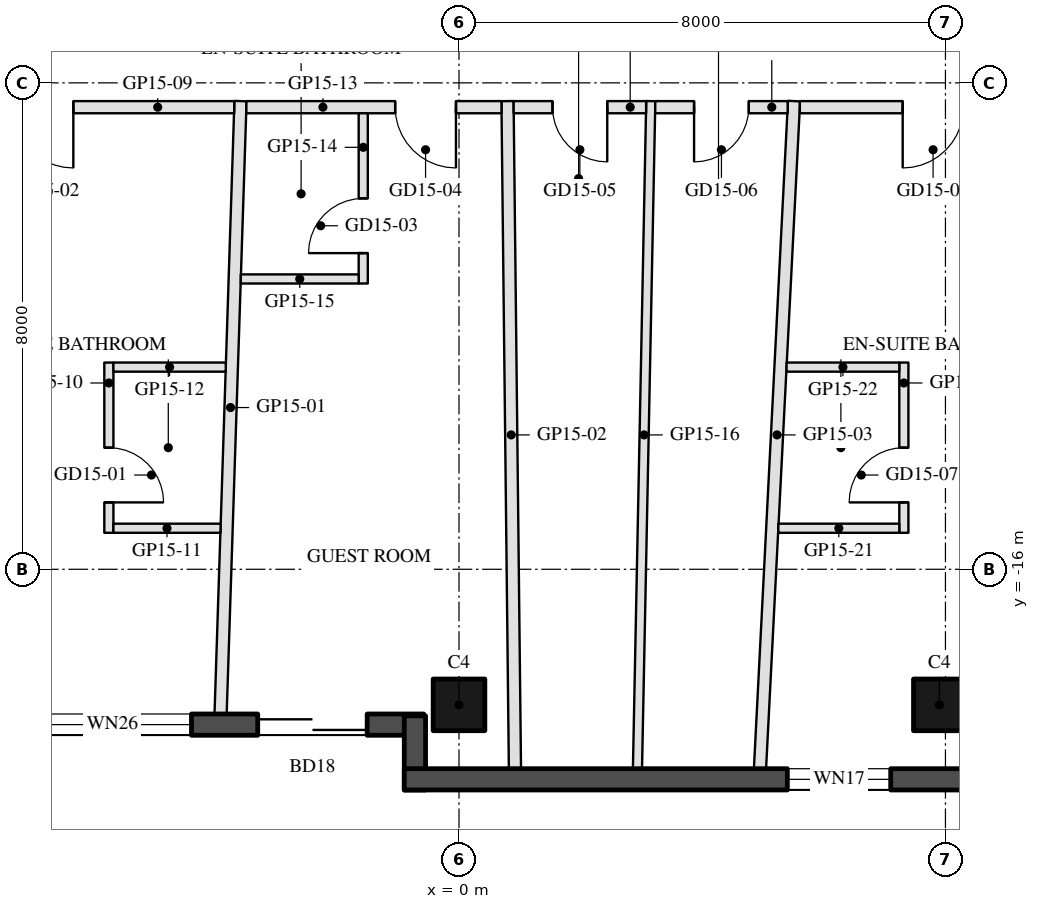
"""IFC4 building model, lengths in metres.
Left out: names, types, materials, properties, quantities, classifications, styles, units other than length and angle.
Written with IfcOpenShell. Run it as: python <this file> out.ifc"""

import sys

from ifc_helpers import new_model, si_unit, direction, frame, frame_2d, origin, origin_2d, place, context, subcontext, project, spatial, rectangle, hollow_rectangle, extrude, element, fill, save


model = new_model("IFC4")
c1 = context("Model", 3, precision=1e-05, world=origin(), true_north=direction((0.0, 1.0)))
c2 = subcontext(c1, "Body", "Model", "MODEL_VIEW")
j1 = project(units=[si_unit("LENGTHUNIT", "METRE"), si_unit("PLANEANGLEUNIT", "RADIAN")], contexts=[c1])
p1 = place(None, origin())
s1 = spatial("IfcSite", under=j1, at=p1, CompositionType="ELEMENT")
p2 = place(p1, origin())
s2 = spatial("IfcBuilding", under=s1, at=p2, CompositionType="ELEMENT")
p3 = place(p2, frame((0.0, 0.0, 172.5)))
s3 = spatial("IfcBuildingStorey", under=s2, at=p3, CompositionType="ELEMENT", Elevation=172.5)
for number, where, z_axis, x_axis in (
    (1, (0.0, -18.23, 0.0), (0.0, 0.0, 1.0), (-1.0, 0.0, 0.0)),
    (2, (7.9, -18.23, 0.0), (0.0, 0.0, 1.0), (-1.0, 0.0, 0.0)),
):
    element("IfcColumn", number, at=place(p3, frame(where, z_axis=z_axis, x_axis=x_axis)), inside=s3, PredefinedType="COLUMN", context=c2, shape_type="SweptSolid", body=[
        extrude(hollow_rectangle(XDim=0.85, YDim=0.85, WallThickness=0.04, at=origin_2d()), origin(), (0.0, 0.0, 1.0), 3.7),
    ])
p4 = place(p3, frame((-7.32, -18.555, 0.0), z_axis=(0.0, 0.0, 1.0), x_axis=(1.0, 0.0, 0.0)))
e3 = element("IfcWall", 3, at=p4, inside=s3, PredefinedType="SOLIDWALL", context=c2, shape_type="SweptSolid", body=[
    extrude(rectangle(XDim=6.74, YDim=0.35, at=frame_2d((3.37, 0.0))), origin(), (0.0, 0.0, 1.0), 3.55),
])
p5 = place(p4, frame((0.32, 0.0, 0.3)))
e4 = element("IfcOpeningElement", 4, at=p5, cuts=e3, PredefinedType="OPENING", context=c2, shape_type="SweptSolid", body=[
    extrude(rectangle(XDim=2.6, YDim=2.65, at=frame_2d((1.3, 1.325))), frame((0.0, 0.185, 0.0), z_axis=(0.0, -1.0, 0.0), x_axis=(1.0, 0.0, 0.0)), (0.0, 0.0, 1.0), 0.37),
])
p6 = place(p4, frame((4.01, 0.0, 0.0)))
e5 = element("IfcOpeningElement", 5, at=p6, cuts=e3, PredefinedType="OPENING", context=c2, shape_type="SweptSolid", body=[
    extrude(rectangle(XDim=1.8, YDim=2.4, at=frame_2d((0.9, 1.2))), frame((0.0, 0.185, 0.0), z_axis=(0.0, -1.0, 0.0), x_axis=(1.0, 0.0, 0.0)), (0.0, 0.0, 1.0), 0.37),
])
p7 = place(p3, frame((-0.725, -18.41, 0.0), z_axis=(0.0, 0.0, 1.0), x_axis=(0.0, -1.0, 0.0)))
e6 = element("IfcWall", 6, at=p7, inside=s3, PredefinedType="SOLIDWALL", context=c2, shape_type="SweptSolid", body=[
    extrude(rectangle(XDim=1.22, YDim=0.35, at=frame_2d((0.61, 0.0))), origin(), (0.0, 0.0, 1.0), 3.55),
])
p8 = place(p3, frame((-0.9, -19.455, 0.0), z_axis=(0.0, 0.0, 1.0), x_axis=(1.0, 0.0, 0.0)))
e7 = element("IfcWall", 7, at=p8, inside=s3, PredefinedType="SOLIDWALL", context=c2, shape_type="SweptSolid", body=[
    extrude(rectangle(XDim=9.7, YDim=0.35, at=frame_2d((4.85, 0.0))), origin(), (0.0, 0.0, 1.0), 3.55),
])
p9 = place(p8, frame((6.3, 0.0, 0.3)))
e8 = element("IfcOpeningElement", 8, at=p9, cuts=e7, PredefinedType="OPENING", context=c2, shape_type="SweptSolid", body=[
    extrude(rectangle(XDim=1.7, YDim=2.65, at=frame_2d((0.85, 1.325))), frame((0.0, 0.185, 0.0), z_axis=(0.0, -1.0, 0.0), x_axis=(1.0, 0.0, 0.0)), (0.0, 0.0, 1.0), 0.37),
])
p10 = place(p3, frame((-3.921, -18.38, 0.0), z_axis=(0.0, 0.0, 1.0), x_axis=(0.032462838588, 0.999472943161, 0.0)))
e9 = element("IfcWall", 9, at=p10, inside=s3, PredefinedType="PARTITIONING", context=c2, shape_type="SweptSolid", body=[
    extrude(rectangle(XDim=10.085, YDim=0.2, at=frame_2d((5.042, 0.0))), origin(), (0.0, 0.0, 1.0), 2.95),
])
p11 = place(p3, frame((0.92, -19.28, 0.0), z_axis=(0.0, 0.0, 1.0), x_axis=(-0.011116847578, 0.999938205941, 0.0)))
e10 = element("IfcWall", 10, at=p11, inside=s3, PredefinedType="PARTITIONING", context=c2, shape_type="SweptSolid", body=[
    extrude(rectangle(XDim=10.981, YDim=0.2, at=frame_2d((5.49, 0.0))), origin(), (0.0, 0.0, 1.0), 3.06),
])
p12 = place(p3, frame((4.95, -19.28, 0.0), z_axis=(0.0, 0.0, 1.0), x_axis=(0.050963172582, 0.998700533213, 0.0)))
e11 = element("IfcWall", 11, at=p12, inside=s3, PredefinedType="PARTITIONING", context=c2, shape_type="SweptSolid", body=[
    extrude(rectangle(XDim=10.994, YDim=0.2, at=frame_2d((5.497, 0.0))), origin(), (0.0, 0.0, 1.0), 3.06),
])
p13 = place(p3, frame((-3.697, -8.4, 0.0), z_axis=(0.0, 0.0, 1.0), x_axis=(-1.0, 0.0, 0.0)))
e12 = element("IfcWall", 12, at=p13, inside=s3, PredefinedType="PARTITIONING", context=c2, shape_type="SweptSolid", body=[
    extrude(rectangle(XDim=6.292, YDim=0.2, at=frame_2d((3.146, 0.0))), origin(), (0.0, 0.0, 1.0), 2.95),
])
p14 = place(p13, frame((2.646, 0.0, 0.0)))
e13 = element("IfcOpeningElement", 13, at=p14, cuts=e12, PredefinedType="OPENING", context=c2, shape_type="SweptSolid", body=[
    extrude(rectangle(XDim=1.0, YDim=2.1, at=frame_2d((0.5, 1.05))), frame((0.0, 0.11, 0.0), z_axis=(0.0, -1.0, 0.0), x_axis=(1.0, 0.0, 0.0)), (0.0, 0.0, 1.0), 0.22),
])
p15 = place(p3, frame((-5.758, -12.6, 0.0), z_axis=(0.0, 0.0, 1.0), x_axis=(0.0, -1.0, 0.0)))
e14 = element("IfcWall", 14, at=p15, inside=s3, PredefinedType="PARTITIONING", context=c2, shape_type="SweptSolid", body=[
    extrude(rectangle(XDim=2.8, YDim=0.15, at=frame_2d((1.4, 0.0))), origin(), (0.0, 0.0, 1.0), 3.55),
])
p16 = place(p15, frame((1.4, 0.0, 0.0)))
e15 = element("IfcOpeningElement", 15, at=p16, cuts=e14, PredefinedType="OPENING", context=c2, shape_type="SweptSolid", body=[
    extrude(rectangle(XDim=0.9, YDim=2.1, at=frame_2d((0.45, 1.05))), frame((0.0, 0.085, 0.0), z_axis=(0.0, -1.0, 0.0), x_axis=(1.0, 0.0, 0.0)), (0.0, 0.0, 1.0), 0.17),
])
p17 = place(p3, frame((-5.683, -15.325, 0.0), z_axis=(0.0, 0.0, 1.0), x_axis=(1.0, 0.0, 0.0)))
e16 = element("IfcWall", 16, at=p17, inside=s3, PredefinedType="PARTITIONING", context=c2, shape_type="SweptSolid", body=[
    extrude(rectangle(XDim=1.761, YDim=0.15, at=frame_2d((0.881, 0.0))), origin(), (0.0, 0.0, 1.0), 2.95),
])
p18 = place(p3, frame((-5.683, -12.675, 0.0), z_axis=(0.0, 0.0, 1.0), x_axis=(1.0, 0.0, 0.0)))
e17 = element("IfcWall", 17, at=p18, inside=s3, PredefinedType="PARTITIONING", context=c2, shape_type="SweptSolid", body=[
    extrude(rectangle(XDim=1.847, YDim=0.15, at=frame_2d((0.924, 0.0))), origin(), (0.0, 0.0, 1.0), 2.95),
])
p19 = place(p3, frame((0.699, -8.4, 0.0), z_axis=(0.0, 0.0, 1.0), x_axis=(-1.0, 0.0, 0.0)))
e18 = element("IfcWall", 18, at=p19, inside=s3, PredefinedType="PARTITIONING", context=c2, shape_type="SweptSolid", body=[
    extrude(rectangle(XDim=4.196, YDim=0.2, at=frame_2d((2.098, 0.0))), origin(), (0.0, 0.0, 1.0), 2.95),
])
p20 = place(p19, frame((0.749, 0.0, 0.0)))
e19 = element("IfcOpeningElement", 19, at=p20, cuts=e18, PredefinedType="OPENING", context=c2, shape_type="SweptSolid", body=[
    extrude(rectangle(XDim=1.0, YDim=2.1, at=frame_2d((0.5, 1.05))), frame((0.0, 0.11, 0.0), z_axis=(0.0, -1.0, 0.0), x_axis=(1.0, 0.0, 0.0)), (0.0, 0.0, 1.0), 0.22),
])
p21 = place(p3, frame((-1.575, -11.3, 0.0), z_axis=(0.0, 0.0, 1.0), x_axis=(0.0, 1.0, 0.0)))
e20 = element("IfcWall", 20, at=p21, inside=s3, PredefinedType="PARTITIONING", context=c2, shape_type="SweptSolid", body=[
    extrude(rectangle(XDim=2.8, YDim=0.15, at=frame_2d((1.4, 0.0))), origin(), (0.0, 0.0, 1.0), 3.55),
])
p22 = place(p21, frame((0.5, 0.0, 0.0)))
e21 = element("IfcOpeningElement", 21, at=p22, cuts=e20, PredefinedType="OPENING", context=c2, shape_type="SweptSolid", body=[
    extrude(rectangle(XDim=0.9, YDim=2.1, at=frame_2d((0.45, 1.05))), frame((0.0, 0.085, 0.0), z_axis=(0.0, -1.0, 0.0), x_axis=(1.0, 0.0, 0.0)), (0.0, 0.0, 1.0), 0.17),
])
p23 = place(p3, frame((-3.588, -11.225, 0.0), z_axis=(0.0, 0.0, 1.0), x_axis=(1.0, 0.0, 0.0)))
e22 = element("IfcWall", 22, at=p23, inside=s3, PredefinedType="PARTITIONING", context=c2, shape_type="SweptSolid", body=[
    extrude(rectangle(XDim=1.938, YDim=0.15, at=frame_2d((0.969, 0.0))), origin(), (0.0, 0.0, 1.0), 3.55),
])
p24 = place(p3, frame((2.935, -19.28, 0.0), z_axis=(0.0, 0.0, 1.0), x_axis=(0.019940891206, 0.99980116066, 0.0)))
e23 = element("IfcWall", 23, at=p24, inside=s3, PredefinedType="PARTITIONING", context=c2, shape_type="SweptSolid", body=[
    extrude(rectangle(XDim=10.982, YDim=0.15, at=frame_2d((5.491, 0.0))), origin(), (0.0, 0.0, 1.0), 3.06),
])
p25 = place(p3, frame((3.077, -8.4, 0.0), z_axis=(0.0, 0.0, 1.0), x_axis=(-1.0, 0.0, 0.0)))
e24 = element("IfcWall", 24, at=p25, inside=s3, PredefinedType="PARTITIONING", context=c2, shape_type="SweptSolid", body=[
    extrude(rectangle(XDim=2.178, YDim=0.2, at=frame_2d((1.089, 0.0))), origin(), (0.0, 0.0, 1.0), 3.55),
])
p26 = place(p25, frame((0.639, 0.0, 0.0)))
e25 = element("IfcOpeningElement", 25, at=p26, cuts=e24, PredefinedType="OPENING", context=c2, shape_type="SweptSolid", body=[
    extrude(rectangle(XDim=0.9, YDim=2.1, at=frame_2d((0.45, 1.05))), frame((0.0, 0.11, 0.0), z_axis=(0.0, -1.0, 0.0), x_axis=(1.0, 0.0, 0.0)), (0.0, 0.0, 1.0), 0.22),
])
p27 = place(p3, frame((5.405, -8.4, 0.0), z_axis=(0.0, 0.0, 1.0), x_axis=(-1.0, 0.0, 0.0)))
e26 = element("IfcWall", 26, at=p27, inside=s3, PredefinedType="PARTITIONING", context=c2, shape_type="SweptSolid", body=[
    extrude(rectangle(XDim=2.178, YDim=0.2, at=frame_2d((1.089, 0.0))), origin(), (0.0, 0.0, 1.0), 2.95),
])
p28 = place(p27, frame((0.639, 0.0, 0.0)))
e27 = element("IfcOpeningElement", 27, at=p28, cuts=e26, PredefinedType="OPENING", context=c2, shape_type="SweptSolid", body=[
    extrude(rectangle(XDim=0.9, YDim=2.1, at=frame_2d((0.45, 1.05))), frame((0.0, 0.11, 0.0), z_axis=(0.0, -1.0, 0.0), x_axis=(1.0, 0.0, 0.0)), (0.0, 0.0, 1.0), 0.22),
])
p29 = place(p3, frame((9.988, -8.4, 0.0), z_axis=(0.0, 0.0, 1.0), x_axis=(-1.0, 0.0, 0.0)))
e28 = element("IfcWall", 28, at=p29, inside=s3, PredefinedType="PARTITIONING", context=c2, shape_type="SweptSolid", body=[
    extrude(rectangle(XDim=4.383, YDim=0.2, at=frame_2d((2.191, 0.0))), origin(), (0.0, 0.0, 1.0), 2.95),
])
p30 = place(p29, frame((1.691, 0.0, 0.0)))
e29 = element("IfcOpeningElement", 29, at=p30, cuts=e28, PredefinedType="OPENING", context=c2, shape_type="SweptSolid", body=[
    extrude(rectangle(XDim=1.0, YDim=2.1, at=frame_2d((0.5, 1.05))), frame((0.0, 0.11, 0.0), z_axis=(0.0, -1.0, 0.0), x_axis=(1.0, 0.0, 0.0)), (0.0, 0.0, 1.0), 0.22),
])
p31 = place(p3, frame((7.316, -15.4, 0.0), z_axis=(0.0, 0.0, 1.0), x_axis=(0.0, 1.0, 0.0)))
e30 = element("IfcWall", 30, at=p31, inside=s3, PredefinedType="PARTITIONING", context=c2, shape_type="SweptSolid", body=[
    extrude(rectangle(XDim=2.8, YDim=0.15, at=frame_2d((1.4, 0.0))), origin(), (0.0, 0.0, 1.0), 3.55),
])
p32 = place(p31, frame((0.5, 0.0, 0.0)))
e31 = element("IfcOpeningElement", 31, at=p32, cuts=e30, PredefinedType="OPENING", context=c2, shape_type="SweptSolid", body=[
    extrude(rectangle(XDim=0.9, YDim=2.1, at=frame_2d((0.45, 1.05))), frame((0.0, 0.085, 0.0), z_axis=(0.0, -1.0, 0.0), x_axis=(1.0, 0.0, 0.0)), (0.0, 0.0, 1.0), 0.17),
])
p33 = place(p3, frame((5.252, -15.325, 0.0), z_axis=(0.0, 0.0, 1.0), x_axis=(1.0, 0.0, 0.0)))
e32 = element("IfcWall", 32, at=p33, inside=s3, PredefinedType="PARTITIONING", context=c2, shape_type="SweptSolid", body=[
    extrude(rectangle(XDim=1.989, YDim=0.15, at=frame_2d((0.995, 0.0))), origin(), (0.0, 0.0, 1.0), 3.55),
])
p34 = place(p3, frame((5.387, -12.675, 0.0), z_axis=(0.0, 0.0, 1.0), x_axis=(1.0, 0.0, 0.0)))
e33 = element("IfcWall", 33, at=p34, inside=s3, PredefinedType="PARTITIONING", context=c2, shape_type="SweptSolid", body=[
    extrude(rectangle(XDim=1.854, YDim=0.15, at=frame_2d((0.927, 0.0))), origin(), (0.0, 0.0, 1.0), 3.55),
])
p35 = place(p5, origin())
e34 = element("IfcWindow", 34, at=p35, inside=s3, PartitioningType="SINGLE_PANEL", PredefinedType="WINDOW", context=c2, shape_type="SweptSolid", body=[
    extrude(rectangle(XDim=2.6, YDim=2.65, at=frame_2d((1.3, 1.325))), frame((0.0, 0.03, 0.0), z_axis=(0.0, -1.0, 0.0), x_axis=(1.0, 0.0, 0.0)), (0.0, 0.0, 1.0), 0.06),
])
fill(e4, e34)
p36 = place(p6, frame((1.8, 0.0, 0.0), z_axis=(0.0, 0.0, 1.0), x_axis=(-1.0, 0.0, 0.0)))
e35 = element("IfcDoor", 35, at=p36, inside=s3, OperationType="SLIDING_TO_LEFT", PredefinedType="DOOR", context=c2, shape_type="SweptSolid", body=[
    extrude(rectangle(XDim=1.8, YDim=2.4, at=frame_2d((0.9, 1.2))), frame((0.0, 0.025, 0.0), z_axis=(0.0, -1.0, 0.0), x_axis=(1.0, 0.0, 0.0)), (0.0, 0.0, 1.0), 0.05),
])
fill(e5, e35)
p37 = place(p9, origin())
e36 = element("IfcWindow", 36, at=p37, inside=s3, PartitioningType="SINGLE_PANEL", PredefinedType="WINDOW", context=c2, shape_type="SweptSolid", body=[
    extrude(rectangle(XDim=1.7, YDim=2.65, at=frame_2d((0.85, 1.325))), frame((0.0, 0.03, 0.0), z_axis=(0.0, -1.0, 0.0), x_axis=(1.0, 0.0, 0.0)), (0.0, 0.0, 1.0), 0.06),
])
fill(e8, e36)
p38 = place(p16, origin())
e37 = element("IfcDoor", 37, at=p38, inside=s3, OperationType="SINGLE_SWING_RIGHT", PredefinedType="DOOR", context=c2, shape_type="SweptSolid", body=[
    extrude(rectangle(XDim=0.9, YDim=2.1, at=frame_2d((0.45, 1.05))), frame((0.0, 0.025, 0.0), z_axis=(0.0, -1.0, 0.0), x_axis=(1.0, 0.0, 0.0)), (0.0, 0.0, 1.0), 0.05),
])
fill(e15, e37)
p39 = place(p14, origin())
e38 = element("IfcDoor", 38, at=p39, inside=s3, OperationType="SINGLE_SWING_LEFT", PredefinedType="DOOR", context=c2, shape_type="SweptSolid", body=[
    extrude(rectangle(XDim=1.0, YDim=2.1, at=frame_2d((0.5, 1.05))), frame((0.0, 0.025, 0.0), z_axis=(0.0, -1.0, 0.0), x_axis=(1.0, 0.0, 0.0)), (0.0, 0.0, 1.0), 0.05),
])
fill(e13, e38)
p40 = place(p22, origin())
e39 = element("IfcDoor", 39, at=p40, inside=s3, OperationType="SINGLE_SWING_LEFT", PredefinedType="DOOR", context=c2, shape_type="SweptSolid", body=[
    extrude(rectangle(XDim=0.9, YDim=2.1, at=frame_2d((0.45, 1.05))), frame((0.0, 0.025, 0.0), z_axis=(0.0, -1.0, 0.0), x_axis=(1.0, 0.0, 0.0)), (0.0, 0.0, 1.0), 0.05),
])
fill(e21, e39)
p41 = place(p20, origin())
e40 = element("IfcDoor", 40, at=p41, inside=s3, OperationType="SINGLE_SWING_LEFT", PredefinedType="DOOR", context=c2, shape_type="SweptSolid", body=[
    extrude(rectangle(XDim=1.0, YDim=2.1, at=frame_2d((0.5, 1.05))), frame((0.0, 0.025, 0.0), z_axis=(0.0, -1.0, 0.0), x_axis=(1.0, 0.0, 0.0)), (0.0, 0.0, 1.0), 0.05),
])
fill(e19, e40)
p42 = place(p26, origin())
e41 = element("IfcDoor", 41, at=p42, inside=s3, OperationType="SINGLE_SWING_LEFT", PredefinedType="DOOR", context=c2, shape_type="SweptSolid", body=[
    extrude(rectangle(XDim=0.9, YDim=2.1, at=frame_2d((0.45, 1.05))), frame((0.0, 0.025, 0.0), z_axis=(0.0, -1.0, 0.0), x_axis=(1.0, 0.0, 0.0)), (0.0, 0.0, 1.0), 0.05),
])
fill(e25, e41)
p43 = place(p28, origin())
e42 = element("IfcDoor", 42, at=p43, inside=s3, OperationType="SINGLE_SWING_RIGHT", PredefinedType="DOOR", context=c2, shape_type="SweptSolid", body=[
    extrude(rectangle(XDim=0.9, YDim=2.1, at=frame_2d((0.45, 1.05))), frame((0.0, 0.025, 0.0), z_axis=(0.0, -1.0, 0.0), x_axis=(1.0, 0.0, 0.0)), (0.0, 0.0, 1.0), 0.05),
])
fill(e27, e42)
p44 = place(p32, origin())
e43 = element("IfcDoor", 43, at=p44, inside=s3, OperationType="SINGLE_SWING_LEFT", PredefinedType="DOOR", context=c2, shape_type="SweptSolid", body=[
    extrude(rectangle(XDim=0.9, YDim=2.1, at=frame_2d((0.45, 1.05))), frame((0.0, 0.025, 0.0), z_axis=(0.0, -1.0, 0.0), x_axis=(1.0, 0.0, 0.0)), (0.0, 0.0, 1.0), 0.05),
])
fill(e31, e43)
p45 = place(p30, origin())
e44 = element("IfcDoor", 44, at=p45, inside=s3, OperationType="SINGLE_SWING_RIGHT", PredefinedType="DOOR", context=c2, shape_type="SweptSolid", body=[
    extrude(rectangle(XDim=1.0, YDim=2.1, at=frame_2d((0.5, 1.05))), frame((0.0, 0.025, 0.0), z_axis=(0.0, -1.0, 0.0), x_axis=(1.0, 0.0, 0.0)), (0.0, 0.0, 1.0), 0.05),
])
fill(e29, e44)
save(model, sys.argv[1])
